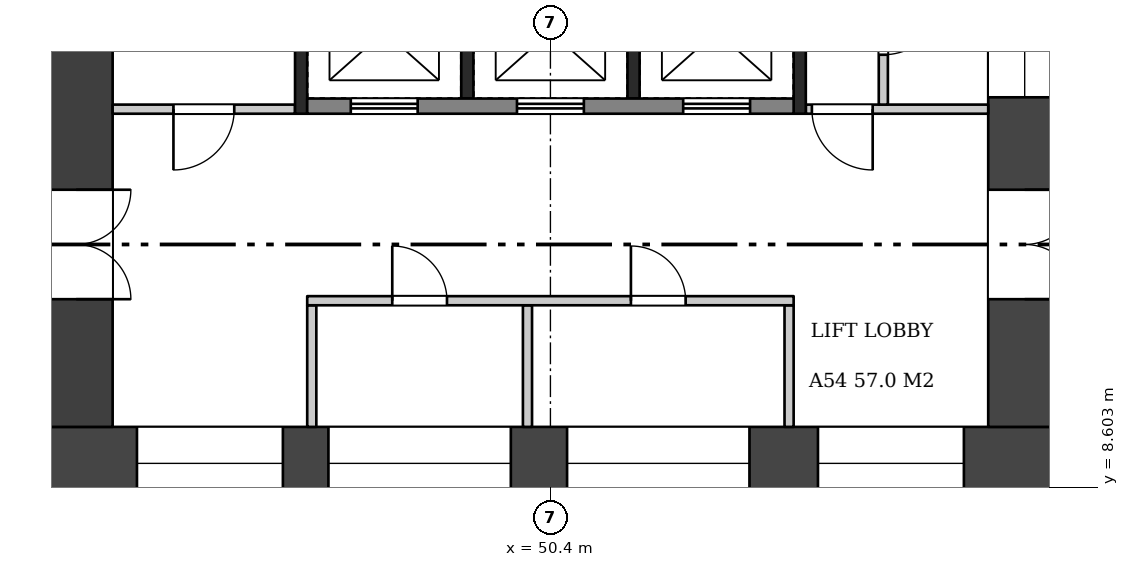
"""IFC4 building model, lengths in metres.
Left out: names, types, materials, properties, quantities, classifications, styles, units other than length and angle.
Written with IfcOpenShell. Run it as: python <this file> out.ifc"""

import sys

from ifc_helpers import new_model, si_unit, direction, frame, frame_2d, origin, place, context, subcontext, project, spatial, rectangle, extrude, element, fill, save


model = new_model("IFC4")
c1 = context("Model", 3, precision=1e-05, world=origin(), true_north=direction((0.0, 1.0)))
c2 = subcontext(c1, "Body", "Model", "MODEL_VIEW")
j1 = project(units=[si_unit("LENGTHUNIT", "METRE"), si_unit("PLANEANGLEUNIT", "RADIAN")], contexts=[c1])
p1 = place(None, origin())
s1 = spatial("IfcSite", under=j1, at=p1, CompositionType="ELEMENT")
p2 = place(p1, origin())
s2 = spatial("IfcBuilding", under=s1, at=p2, CompositionType="ELEMENT")
p3 = place(p2, frame((0.0, 0.0, 207.2)))
s3 = spatial("IfcBuildingStorey", under=s2, at=p3, CompositionType="ELEMENT", Elevation=207.2)
p4 = place(p3, frame((42.0, 9.0, 0.0), z_axis=(0.0, 0.0, 1.0), x_axis=(1.0, 0.0, 0.0)))
e1 = element("IfcWall", 1, at=p4, inside=s3, PredefinedType="SHEAR", context=c2, shape_type="SweptSolid", body=[
    extrude(rectangle(XDim=16.8, YDim=1.2, at=frame_2d((8.4, 0.0))), origin(), (0.0, 0.0, 1.0), 6.72),
])
p5 = place(p4, frame((1.6, 0.0, 0.6)))
e2 = element("IfcOpeningElement", 2, at=p5, cuts=e1, PredefinedType="OPENING", context=c2, shape_type="SweptSolid", body=[
    extrude(rectangle(XDim=2.4, YDim=2.1, at=frame_2d((1.2, 1.05))), frame((0.0, 0.61, 0.0), z_axis=(0.0, -1.0, 0.0), x_axis=(1.0, 0.0, 0.0)), (0.0, 0.0, 1.0), 1.22),
])
p6 = place(p4, frame((4.749, 0.0, 1.6)))
e3 = element("IfcOpeningElement", 3, at=p6, cuts=e1, PredefinedType="OPENING", context=c2, shape_type="SweptSolid", body=[
    extrude(rectangle(XDim=3.0, YDim=1.2, at=frame_2d((1.5, 0.6))), frame((0.0, 0.61, 0.0), z_axis=(0.0, -1.0, 0.0), x_axis=(1.0, 0.0, 0.0)), (0.0, 0.0, 1.0), 1.22),
])
p7 = place(p4, frame((8.674, 0.0, 1.6)))
e4 = element("IfcOpeningElement", 4, at=p7, cuts=e1, PredefinedType="OPENING", context=c2, shape_type="SweptSolid", body=[
    extrude(rectangle(XDim=3.0, YDim=1.2, at=frame_2d((1.5, 0.6))), frame((0.0, 0.61, 0.0), z_axis=(0.0, -1.0, 0.0), x_axis=(1.0, 0.0, 0.0)), (0.0, 0.0, 1.0), 1.22),
])
p8 = place(p4, frame((12.8, 0.0, 0.6)))
e5 = element("IfcOpeningElement", 5, at=p8, cuts=e1, PredefinedType="OPENING", context=c2, shape_type="SweptSolid", body=[
    extrude(rectangle(XDim=2.4, YDim=2.1, at=frame_2d((1.2, 1.05))), frame((0.0, 0.61, 0.0), z_axis=(0.0, -1.0, 0.0), x_axis=(1.0, 0.0, 0.0)), (0.0, 0.0, 1.0), 1.22),
])
p9 = place(p3, frame((42.6, 9.6, 0.0), z_axis=(0.0, 0.0, 1.0), x_axis=(0.0, 1.0, 0.0)))
e6 = element("IfcWall", 6, at=p9, inside=s3, PredefinedType="SHEAR", context=c2, shape_type="SweptSolid", body=[
    extrude(rectangle(XDim=14.4, YDim=1.2, at=frame_2d((7.2, 0.0))), origin(), (0.0, 0.0, 1.0), 6.72),
])
p10 = place(p9, frame((2.1, 0.0, 0.0)))
e7 = element("IfcOpeningElement", 7, at=p10, cuts=e6, PredefinedType="OPENING", context=c2, shape_type="SweptSolid", body=[
    extrude(rectangle(XDim=1.8, YDim=2.1, at=frame_2d((0.9, 1.05))), frame((0.0, 0.61, 0.0), z_axis=(0.0, -1.0, 0.0), x_axis=(1.0, 0.0, 0.0)), (0.0, 0.0, 1.0), 1.22),
])
p11 = place(p3, frame((58.2, 9.6, 0.0), z_axis=(0.0, 0.0, 1.0), x_axis=(0.0, 1.0, 0.0)))
e8 = element("IfcWall", 8, at=p11, inside=s3, PredefinedType="SHEAR", context=c2, shape_type="SweptSolid", body=[
    extrude(rectangle(XDim=14.4, YDim=1.2, at=frame_2d((7.2, 0.0))), origin(), (0.0, 0.0, 1.0), 6.72),
])
p12 = place(p11, frame((2.1, 0.0, 0.0)))
e9 = element("IfcOpeningElement", 9, at=p12, cuts=e8, PredefinedType="OPENING", context=c2, shape_type="SweptSolid", body=[
    extrude(rectangle(XDim=1.8, YDim=2.1, at=frame_2d((0.9, 1.05))), frame((0.0, 0.61, 0.0), z_axis=(0.0, -1.0, 0.0), x_axis=(1.0, 0.0, 0.0)), (0.0, 0.0, 1.0), 1.22),
])
p13 = place(p11, frame((5.42, 0.0, 1.6)))
e10 = element("IfcOpeningElement", 10, at=p13, cuts=e8, PredefinedType="OPENING", context=c2, shape_type="SweptSolid", body=[
    extrude(rectangle(XDim=2.4, YDim=1.2, at=frame_2d((1.2, 0.6))), frame((0.0, 0.61, 0.0), z_axis=(0.0, -1.0, 0.0), x_axis=(1.0, 0.0, 0.0)), (0.0, 0.0, 1.0), 1.22),
])
p14 = place(p11, frame((8.21, 0.0, 1.6)))
e11 = element("IfcOpeningElement", 11, at=p14, cuts=e8, PredefinedType="OPENING", context=c2, shape_type="SweptSolid", body=[
    extrude(rectangle(XDim=2.4, YDim=1.2, at=frame_2d((1.2, 0.6))), frame((0.0, 0.61, 0.0), z_axis=(0.0, -1.0, 0.0), x_axis=(1.0, 0.0, 0.0)), (0.0, 0.0, 1.0), 1.22),
])
p15 = place(p11, frame((11.11, 0.0, 1.6)))
e12 = element("IfcOpeningElement", 12, at=p15, cuts=e8, PredefinedType="OPENING", context=c2, shape_type="SweptSolid", body=[
    extrude(rectangle(XDim=3.0, YDim=1.2, at=frame_2d((1.5, 0.6))), frame((0.0, 0.61, 0.0), z_axis=(0.0, -1.0, 0.0), x_axis=(1.0, 0.0, 0.0)), (0.0, 0.0, 1.0), 1.22),
])
for number, where, z_axis, x_axis in (
    (13, (46.475, 9.6, 0.0), (0.0, 0.0, 1.0), (0.0, 1.0, 0.0)),
    (14, (54.325, 9.6, 0.0), (0.0, 0.0, 1.0), (0.0, 1.0, 0.0)),
    (15, (50.022, 9.6, 0.0), (0.0, 0.0, 1.0), (0.0, 1.0, 0.0)),
):
    element("IfcWall", number, at=place(p3, frame(where, z_axis=z_axis, x_axis=x_axis)), inside=s3, PredefinedType="PARTITIONING", context=c2, shape_type="SweptSolid", body=[
        extrude(rectangle(XDim=2.0, YDim=0.15, at=frame_2d((1.0, 0.0))), origin(), (0.0, 0.0, 1.0), 6.72),
    ])
p16 = place(p3, frame((46.4, 11.675, 0.0), z_axis=(0.0, 0.0, 1.0), x_axis=(1.0, 0.0, 0.0)))
e16 = element("IfcWall", 16, at=p16, inside=s3, PredefinedType="PARTITIONING", context=c2, shape_type="SweptSolid", body=[
    extrude(rectangle(XDim=8.0, YDim=0.15, at=frame_2d((4.0, 0.0))), origin(), (0.0, 0.0, 1.0), 6.72),
])
p17 = place(p16, frame((1.399, 0.0, 0.0)))
e17 = element("IfcOpeningElement", 17, at=p17, cuts=e16, PredefinedType="OPENING", context=c2, shape_type="SweptSolid", body=[
    extrude(rectangle(XDim=0.9, YDim=2.1, at=frame_2d((0.45, 1.05))), frame((0.0, 0.085, 0.0), z_axis=(0.0, -1.0, 0.0), x_axis=(1.0, 0.0, 0.0)), (0.0, 0.0, 1.0), 0.17),
])
p18 = place(p16, frame((5.324, 0.0, 0.0)))
e18 = element("IfcOpeningElement", 18, at=p18, cuts=e16, PredefinedType="OPENING", context=c2, shape_type="SweptSolid", body=[
    extrude(rectangle(XDim=0.9, YDim=2.1, at=frame_2d((0.45, 1.05))), frame((0.0, 0.085, 0.0), z_axis=(0.0, -1.0, 0.0), x_axis=(1.0, 0.0, 0.0)), (0.0, 0.0, 1.0), 0.17),
])
for number, where, z_axis, x_axis in (
    (19, (49.033, 15.0, 0.0), (0.0, 0.0, 1.0), (0.0, 1.0, 0.0)),
    (20, (51.767, 15.0, 0.0), (0.0, 0.0, 1.0), (0.0, 1.0, 0.0)),
):
    element("IfcWall", number, at=place(p3, frame(where, z_axis=z_axis, x_axis=x_axis)), inside=s3, PredefinedType="SHEAR", context=c2, shape_type="SweptSolid", body=[
        extrude(rectangle(XDim=1.9, YDim=0.2, at=frame_2d((0.95, 0.0))), origin(), (0.0, 0.0, 1.0), 6.72),
    ])
p19 = place(p3, frame((46.4, 14.875, 0.0), z_axis=(0.0, 0.0, 1.0), x_axis=(1.0, 0.0, 0.0)))
e21 = element("IfcWall", 21, at=p19, inside=s3, PredefinedType="SHEAR", context=c2, shape_type="SweptSolid", body=[
    extrude(rectangle(XDim=8.0, YDim=0.25, at=frame_2d((4.0, 0.0))), origin(), (0.0, 0.0, 1.0), 6.72),
])
p20 = place(p19, frame((0.717, 0.0, 0.0)))
e22 = element("IfcOpeningElement", 22, at=p20, cuts=e21, PredefinedType="OPENING", context=c2, shape_type="SweptSolid", body=[
    extrude(rectangle(XDim=1.1, YDim=2.1, at=frame_2d((0.55, 1.05))), frame((0.0, 0.135, 0.0), z_axis=(0.0, -1.0, 0.0), x_axis=(1.0, 0.0, 0.0)), (0.0, 0.0, 1.0), 0.27),
])
p21 = place(p19, frame((3.45, 0.0, 0.0)))
e23 = element("IfcOpeningElement", 23, at=p21, cuts=e21, PredefinedType="OPENING", context=c2, shape_type="SweptSolid", body=[
    extrude(rectangle(XDim=1.1, YDim=2.1, at=frame_2d((0.55, 1.05))), frame((0.0, 0.135, 0.0), z_axis=(0.0, -1.0, 0.0), x_axis=(1.0, 0.0, 0.0)), (0.0, 0.0, 1.0), 0.27),
])
p22 = place(p19, frame((6.183, 0.0, 0.0)))
e24 = element("IfcOpeningElement", 24, at=p22, cuts=e21, PredefinedType="OPENING", context=c2, shape_type="SweptSolid", body=[
    extrude(rectangle(XDim=1.1, YDim=2.1, at=frame_2d((0.55, 1.05))), frame((0.0, 0.135, 0.0), z_axis=(0.0, -1.0, 0.0), x_axis=(1.0, 0.0, 0.0)), (0.0, 0.0, 1.0), 0.27),
])
p23 = place(p3, frame((46.3, 14.75, 0.0), z_axis=(0.0, 0.0, 1.0), x_axis=(0.0, 1.0, 0.0)))
e25 = element("IfcWall", 25, at=p23, inside=s3, PredefinedType="SHEAR", context=c2, shape_type="SweptSolid", body=[
    extrude(rectangle(XDim=2.4, YDim=0.2, at=frame_2d((1.2, 0.0))), origin(), (0.0, 0.0, 1.0), 6.72),
])
p24 = place(p3, frame((43.2, 14.825, 0.0), z_axis=(0.0, 0.0, 1.0), x_axis=(1.0, 0.0, 0.0)))
e26 = element("IfcWall", 26, at=p24, inside=s3, PredefinedType="PARTITIONING", context=c2, shape_type="SweptSolid", body=[
    extrude(rectangle(XDim=3.0, YDim=0.15, at=frame_2d((1.5, 0.0))), origin(), (0.0, 0.0, 1.0), 6.72),
])
p25 = place(p24, frame((1.0, 0.0, 0.0)))
e27 = element("IfcOpeningElement", 27, at=p25, cuts=e26, PredefinedType="OPENING", context=c2, shape_type="SweptSolid", body=[
    extrude(rectangle(XDim=1.0, YDim=2.1, at=frame_2d((0.5, 1.05))), frame((0.0, 0.085, 0.0), z_axis=(0.0, -1.0, 0.0), x_axis=(1.0, 0.0, 0.0)), (0.0, 0.0, 1.0), 0.17),
])
p26 = place(p3, frame((54.5, 14.75, 0.0), z_axis=(0.0, 0.0, 1.0), x_axis=(0.0, 1.0, 0.0)))
e28 = element("IfcWall", 28, at=p26, inside=s3, PredefinedType="SHEAR", context=c2, shape_type="SweptSolid", body=[
    extrude(rectangle(XDim=9.25, YDim=0.2, at=frame_2d((4.625, 0.0))), origin(), (0.0, 0.0, 1.0), 6.72),
])
p27 = place(p3, frame((54.6, 14.825, 0.0), z_axis=(0.0, 0.0, 1.0), x_axis=(1.0, 0.0, 0.0)))
e29 = element("IfcWall", 29, at=p27, inside=s3, PredefinedType="PARTITIONING", context=c2, shape_type="SweptSolid", body=[
    extrude(rectangle(XDim=3.0, YDim=0.15, at=frame_2d((1.5, 0.0))), origin(), (0.0, 0.0, 1.0), 6.72),
])
p28 = place(p27, frame((0.1, 0.0, 0.0)))
e30 = element("IfcOpeningElement", 30, at=p28, cuts=e29, PredefinedType="OPENING", context=c2, shape_type="SweptSolid", body=[
    extrude(rectangle(XDim=1.0, YDim=2.1, at=frame_2d((0.5, 1.05))), frame((0.0, 0.085, 0.0), z_axis=(0.0, -1.0, 0.0), x_axis=(1.0, 0.0, 0.0)), (0.0, 0.0, 1.0), 0.17),
])
p29 = place(p3, frame((55.875, 14.9, 0.0), z_axis=(0.0, 0.0, 1.0), x_axis=(0.0, 1.0, 0.0)))
e31 = element("IfcWall", 31, at=p29, inside=s3, PredefinedType="PARTITIONING", context=c2, shape_type="SweptSolid", body=[
    extrude(rectangle(XDim=9.1, YDim=0.15, at=frame_2d((4.55, 0.0))), origin(), (0.0, 0.0, 1.0), 6.72),
])
p30 = place(p29, frame((0.82, 0.0, 0.0)))
e32 = element("IfcOpeningElement", 32, at=p30, cuts=e31, PredefinedType="OPENING", context=c2, shape_type="SweptSolid", body=[
    extrude(rectangle(XDim=1.0, YDim=2.1, at=frame_2d((0.5, 1.05))), frame((0.0, 0.085, 0.0), z_axis=(0.0, -1.0, 0.0), x_axis=(1.0, 0.0, 0.0)), (0.0, 0.0, 1.0), 0.17),
])
p31 = place(p29, frame((3.66, 0.0, 0.0)))
e33 = element("IfcOpeningElement", 33, at=p31, cuts=e31, PredefinedType="OPENING", context=c2, shape_type="SweptSolid", body=[
    extrude(rectangle(XDim=0.9, YDim=2.1, at=frame_2d((0.45, 1.05))), frame((0.0, 0.085, 0.0), z_axis=(0.0, -1.0, 0.0), x_axis=(1.0, 0.0, 0.0)), (0.0, 0.0, 1.0), 0.17),
])
p32 = place(p29, frame((6.89, 0.0, 0.0)))
e34 = element("IfcOpeningElement", 34, at=p32, cuts=e31, PredefinedType="OPENING", context=c2, shape_type="SweptSolid", body=[
    extrude(rectangle(XDim=0.9, YDim=2.1, at=frame_2d((0.45, 1.05))), frame((0.0, 0.085, 0.0), z_axis=(0.0, -1.0, 0.0), x_axis=(1.0, 0.0, 0.0)), (0.0, 0.0, 1.0), 0.17),
])
p33 = place(p10, frame((1.8, 0.0, 0.0), z_axis=(0.0, 0.0, 1.0), x_axis=(-1.0, 0.0, 0.0)))
e35 = element("IfcDoor", 35, at=p33, inside=s3, OperationType="DOUBLE_DOOR_SINGLE_SWING", PredefinedType="DOOR", context=c2, shape_type="SweptSolid", body=[
    extrude(rectangle(XDim=1.8, YDim=2.1, at=frame_2d((0.9, 1.05))), frame((0.0, 0.025, 0.0), z_axis=(0.0, -1.0, 0.0), x_axis=(1.0, 0.0, 0.0)), (0.0, 0.0, 1.0), 0.05),
])
fill(e7, e35)
p34 = place(p12, frame((1.8, 0.0, 0.0), z_axis=(0.0, 0.0, 1.0), x_axis=(-1.0, 0.0, 0.0)))
e36 = element("IfcDoor", 36, at=p34, inside=s3, OperationType="DOUBLE_DOOR_SINGLE_SWING", PredefinedType="DOOR", context=c2, shape_type="SweptSolid", body=[
    extrude(rectangle(XDim=1.8, YDim=2.1, at=frame_2d((0.9, 1.05))), frame((0.0, 0.325, 0.0), z_axis=(0.0, -1.0, 0.0), x_axis=(1.0, 0.0, 0.0)), (0.0, 0.0, 1.0), 0.05),
])
fill(e9, e36)
p35 = place(p17, origin())
e37 = element("IfcDoor", 37, at=p35, inside=s3, OperationType="SINGLE_SWING_LEFT", PredefinedType="DOOR", context=c2, shape_type="SweptSolid", body=[
    extrude(rectangle(XDim=0.9, YDim=2.1, at=frame_2d((0.45, 1.05))), frame((0.0, 0.025, 0.0), z_axis=(0.0, -1.0, 0.0), x_axis=(1.0, 0.0, 0.0)), (0.0, 0.0, 1.0), 0.05),
])
fill(e17, e37)
p36 = place(p18, origin())
e38 = element("IfcDoor", 38, at=p36, inside=s3, OperationType="SINGLE_SWING_LEFT", PredefinedType="DOOR", context=c2, shape_type="SweptSolid", body=[
    extrude(rectangle(XDim=0.9, YDim=2.1, at=frame_2d((0.45, 1.05))), frame((0.0, 0.025, 0.0), z_axis=(0.0, -1.0, 0.0), x_axis=(1.0, 0.0, 0.0)), (0.0, 0.0, 1.0), 0.05),
])
fill(e18, e38)
p37 = place(p20, origin())
e39 = element("IfcDoor", 39, at=p37, inside=s3, OperationType="DOUBLE_DOOR_SLIDING", PredefinedType="DOOR", context=c2, shape_type="SweptSolid", body=[
    extrude(rectangle(XDim=1.1, YDim=2.1, at=frame_2d((0.55, 1.05))), frame((0.0, 0.025, 0.0), z_axis=(0.0, -1.0, 0.0), x_axis=(1.0, 0.0, 0.0)), (0.0, 0.0, 1.0), 0.05),
])
fill(e22, e39)
p38 = place(p21, origin())
e40 = element("IfcDoor", 40, at=p38, inside=s3, OperationType="DOUBLE_DOOR_SLIDING", PredefinedType="DOOR", context=c2, shape_type="SweptSolid", body=[
    extrude(rectangle(XDim=1.1, YDim=2.1, at=frame_2d((0.55, 1.05))), frame((0.0, 0.025, 0.0), z_axis=(0.0, -1.0, 0.0), x_axis=(1.0, 0.0, 0.0)), (0.0, 0.0, 1.0), 0.05),
])
fill(e23, e40)
p39 = place(p22, origin())
e41 = element("IfcDoor", 41, at=p39, inside=s3, OperationType="DOUBLE_DOOR_SLIDING", PredefinedType="DOOR", context=c2, shape_type="SweptSolid", body=[
    extrude(rectangle(XDim=1.1, YDim=2.1, at=frame_2d((0.55, 1.05))), frame((0.0, 0.025, 0.0), z_axis=(0.0, -1.0, 0.0), x_axis=(1.0, 0.0, 0.0)), (0.0, 0.0, 1.0), 0.05),
])
fill(e24, e41)
p40 = place(p25, frame((1.0, 0.0, 0.0), z_axis=(0.0, 0.0, 1.0), x_axis=(-1.0, 0.0, 0.0)))
e42 = element("IfcDoor", 42, at=p40, inside=s3, OperationType="SINGLE_SWING_RIGHT", PredefinedType="DOOR", context=c2, shape_type="SweptSolid", body=[
    extrude(rectangle(XDim=1.0, YDim=2.1, at=frame_2d((0.5, 1.05))), frame((0.0, 0.025, 0.0), z_axis=(0.0, -1.0, 0.0), x_axis=(1.0, 0.0, 0.0)), (0.0, 0.0, 1.0), 0.05),
])
fill(e27, e42)
p41 = place(p28, frame((1.0, 0.0, 0.0), z_axis=(0.0, 0.0, 1.0), x_axis=(-1.0, 0.0, 0.0)))
e43 = element("IfcDoor", 43, at=p41, inside=s3, OperationType="SINGLE_SWING_LEFT", PredefinedType="DOOR", context=c2, shape_type="SweptSolid", body=[
    extrude(rectangle(XDim=1.0, YDim=2.1, at=frame_2d((0.5, 1.05))), frame((0.0, 0.025, 0.0), z_axis=(0.0, -1.0, 0.0), x_axis=(1.0, 0.0, 0.0)), (0.0, 0.0, 1.0), 0.05),
])
fill(e30, e43)
p42 = place(p30, frame((1.0, 0.0, 0.0), z_axis=(0.0, 0.0, 1.0), x_axis=(-1.0, 0.0, 0.0)))
e44 = element("IfcDoor", 44, at=p42, inside=s3, OperationType="SINGLE_SWING_LEFT", PredefinedType="DOOR", context=c2, shape_type="SweptSolid", body=[
    extrude(rectangle(XDim=1.0, YDim=2.1, at=frame_2d((0.5, 1.05))), frame((0.0, 0.025, 0.0), z_axis=(0.0, -1.0, 0.0), x_axis=(1.0, 0.0, 0.0)), (0.0, 0.0, 1.0), 0.05),
])
fill(e32, e44)
p43 = place(p5, origin())
e45 = element("IfcWindow", 45, at=p43, inside=s3, PartitioningType="SINGLE_PANEL", PredefinedType="WINDOW", context=c2, shape_type="SweptSolid", body=[
    extrude(rectangle(XDim=2.4, YDim=2.1, at=frame_2d((1.2, 1.05))), frame((0.0, 0.03, 0.0), z_axis=(0.0, -1.0, 0.0), x_axis=(1.0, 0.0, 0.0)), (0.0, 0.0, 1.0), 0.06),
])
fill(e2, e45)
p44 = place(p6, origin())
e46 = element("IfcWindow", 46, at=p44, inside=s3, PartitioningType="SINGLE_PANEL", PredefinedType="WINDOW", context=c2, shape_type="SweptSolid", body=[
    extrude(rectangle(XDim=3.0, YDim=1.2, at=frame_2d((1.5, 0.6))), frame((0.0, 0.03, 0.0), z_axis=(0.0, -1.0, 0.0), x_axis=(1.0, 0.0, 0.0)), (0.0, 0.0, 1.0), 0.06),
])
fill(e3, e46)
p45 = place(p7, origin())
e47 = element("IfcWindow", 47, at=p45, inside=s3, PartitioningType="SINGLE_PANEL", PredefinedType="WINDOW", context=c2, shape_type="SweptSolid", body=[
    extrude(rectangle(XDim=3.0, YDim=1.2, at=frame_2d((1.5, 0.6))), frame((0.0, 0.03, 0.0), z_axis=(0.0, -1.0, 0.0), x_axis=(1.0, 0.0, 0.0)), (0.0, 0.0, 1.0), 0.06),
])
fill(e4, e47)
p46 = place(p8, origin())
e48 = element("IfcWindow", 48, at=p46, inside=s3, PartitioningType="SINGLE_PANEL", PredefinedType="WINDOW", context=c2, shape_type="SweptSolid", body=[
    extrude(rectangle(XDim=2.4, YDim=2.1, at=frame_2d((1.2, 1.05))), frame((0.0, 0.03, 0.0), z_axis=(0.0, -1.0, 0.0), x_axis=(1.0, 0.0, 0.0)), (0.0, 0.0, 1.0), 0.06),
])
fill(e5, e48)
p47 = place(p13, origin())
e49 = element("IfcWindow", 49, at=p47, inside=s3, PartitioningType="SINGLE_PANEL", PredefinedType="WINDOW", context=c2, shape_type="SweptSolid", body=[
    extrude(rectangle(XDim=2.4, YDim=1.2, at=frame_2d((1.2, 0.6))), frame((0.0, 0.03, 0.0), z_axis=(0.0, -1.0, 0.0), x_axis=(1.0, 0.0, 0.0)), (0.0, 0.0, 1.0), 0.06),
])
fill(e10, e49)
save(model, sys.argv[1])
